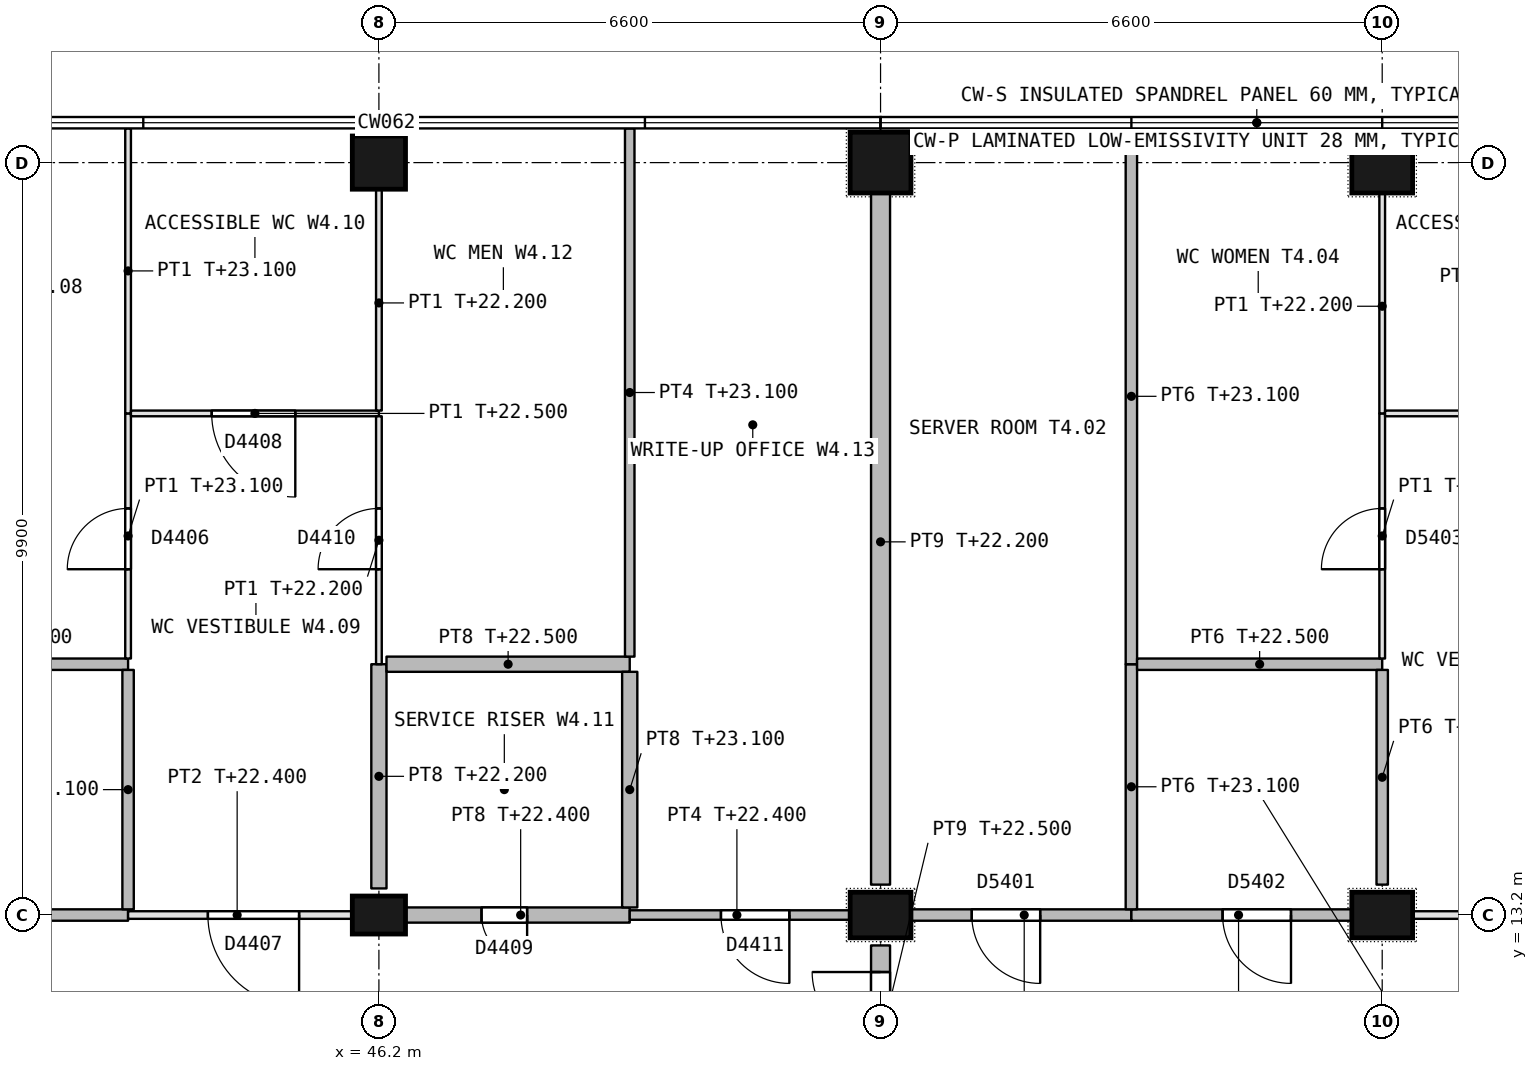
"""IFC4 building model, lengths in metres.
Left out: names, types, materials, properties, quantities, classifications, styles, units other than length and angle.
Written with IfcOpenShell. Run it as: python <this file> out.ifc"""

import sys

from ifc_helpers import new_model, si_unit, direction, frame, frame_2d, origin, origin_2d, place, context, subcontext, project, spatial, rectangle, extrude, element, fill, save


model = new_model("IFC4")
c1 = context("Model", 3, precision=1e-05, world=origin(), true_north=direction((0.0, 1.0)))
c2 = subcontext(c1, "Body", "Model", "MODEL_VIEW")
j1 = project(units=[si_unit("LENGTHUNIT", "METRE"), si_unit("PLANEANGLEUNIT", "RADIAN")], contexts=[c1])
p1 = place(None, origin())
s1 = spatial("IfcSite", under=j1, at=p1, CompositionType="ELEMENT")
p2 = place(p1, origin())
s2 = spatial("IfcBuilding", under=s1, at=p2, CompositionType="ELEMENT")
p3 = place(p2, frame((0.0, 0.0, 18.9)))
s3 = spatial("IfcBuildingStorey", under=s2, at=p3, CompositionType="ELEMENT", Elevation=18.9)
p4 = place(p3, frame((46.2, 13.2, 0.0), z_axis=(0.0, 0.0, 1.0), x_axis=(1.0, 0.0, 0.0)))
e1 = element("IfcColumn", 1, at=p4, inside=s3, PredefinedType="COLUMN", context=c2, shape_type="SweptSolid", body=[
    extrude(rectangle(XDim=0.7, YDim=0.5, at=origin_2d()), origin(), (0.0, 0.0, 1.0), 4.5),
])
p5 = place(p3, frame((46.2, 23.1, 0.0), z_axis=(0.0, 0.0, 1.0), x_axis=(1.0, 0.0, 0.0)))
e2 = element("IfcColumn", 2, at=p5, inside=s3, PredefinedType="COLUMN", context=c2, shape_type="SweptSolid", body=[
    extrude(rectangle(XDim=0.7, YDim=0.7, at=origin_2d()), origin(), (0.0, 0.0, 1.0), 4.5),
])
p6 = place(p3, frame((52.8, 13.2, 0.0), z_axis=(0.0, 0.0, 1.0), x_axis=(1.0, 0.0, 0.0)))
e3 = element("IfcColumn", 3, at=p6, inside=s3, PredefinedType="COLUMN", context=c2, shape_type="SweptSolid", body=[
    extrude(rectangle(XDim=0.8, YDim=0.6, at=origin_2d()), origin(), (0.0, 0.0, 1.0), 4.5),
])
p7 = place(p3, frame((52.8, 23.1, 0.0), z_axis=(0.0, 0.0, 1.0), x_axis=(1.0, 0.0, 0.0)))
e4 = element("IfcColumn", 4, at=p7, inside=s3, PredefinedType="COLUMN", context=c2, shape_type="SweptSolid", body=[
    extrude(rectangle(XDim=0.8, YDim=0.8, at=origin_2d()), origin(), (0.0, 0.0, 1.0), 4.5),
])
p8 = place(p3, frame((59.4, 13.2, 0.0), z_axis=(0.0, 0.0, 1.0), x_axis=(1.0, 0.0, 0.0)))
e5 = element("IfcColumn", 5, at=p8, inside=s3, PredefinedType="COLUMN", context=c2, shape_type="SweptSolid", body=[
    extrude(rectangle(XDim=0.8, YDim=0.6, at=origin_2d()), origin(), (0.0, 0.0, 1.0), 4.5),
])
p9 = place(p3, frame((59.4, 23.1, 0.0), z_axis=(0.0, 0.0, 1.0), x_axis=(1.0, 0.0, 0.0)))
e6 = element("IfcColumn", 6, at=p9, inside=s3, PredefinedType="COLUMN", context=c2, shape_type="SweptSolid", body=[
    extrude(rectangle(XDim=0.8, YDim=0.8, at=origin_2d()), origin(), (0.0, 0.0, 1.0), 4.5),
])
p10 = place(p3, frame((42.9, 13.2, 0.0), z_axis=(0.0, 0.0, 1.0), x_axis=(-1.0, 0.0, 0.0)))
e7 = element("IfcWall", 7, at=p10, inside=s3, PredefinedType="PARTITIONING", context=c2, shape_type="SweptSolid", body=[
    extrude(rectangle(XDim=3.3, YDim=0.15, at=frame_2d((1.65, 0.0))), origin(), (0.0, 0.0, 1.0), 3.5),
])
p11 = place(p10, frame((1.2, 0.0, 0.0)))
e8 = element("IfcOpeningElement", 8, at=p11, cuts=e7, PredefinedType="OPENING", context=c2, shape_type="SweptSolid", body=[
    extrude(rectangle(XDim=0.9, YDim=2.1, at=frame_2d((0.45, 1.05))), frame((0.0, 0.085, 0.0), z_axis=(0.0, -1.0, 0.0), x_axis=(1.0, 0.0, 0.0)), (0.0, 0.0, 1.0), 0.17),
])
p12 = place(p3, frame((42.9, 13.2, 0.0), z_axis=(0.0, 0.0, 1.0), x_axis=(1.0, 0.0, 0.0)))
e9 = element("IfcWall", 9, at=p12, inside=s3, PredefinedType="PARTITIONING", context=c2, shape_type="SweptSolid", body=[
    extrude(rectangle(XDim=2.95, YDim=0.1, at=frame_2d((1.475, 0.0))), origin(), (0.0, 0.0, 1.0), 3.5),
])
p13 = place(p12, frame((1.05, 0.0, 0.0)))
e10 = element("IfcOpeningElement", 10, at=p13, cuts=e9, PredefinedType="OPENING", context=c2, shape_type="SweptSolid", body=[
    extrude(rectangle(XDim=1.2, YDim=2.1, at=frame_2d((0.6, 1.05))), frame((0.0, 0.06, 0.0), z_axis=(0.0, -1.0, 0.0), x_axis=(1.0, 0.0, 0.0)), (0.0, 0.0, 1.0), 0.12),
])
p14 = place(p3, frame((46.55, 13.2, 0.0), z_axis=(0.0, 0.0, 1.0), x_axis=(1.0, 0.0, 0.0)))
e11 = element("IfcWall", 11, at=p14, inside=s3, PredefinedType="PARTITIONING", context=c2, shape_type="SweptSolid", body=[
    extrude(rectangle(XDim=2.95, YDim=0.2, at=frame_2d((1.475, 0.0))), origin(), (0.0, 0.0, 1.0), 3.5),
])
p15 = place(p14, frame((1.0, 0.0, 0.0)))
e12 = element("IfcOpeningElement", 12, at=p15, cuts=e11, PredefinedType="OPENING", context=c2, shape_type="SweptSolid", body=[
    extrude(rectangle(XDim=0.6, YDim=2.1, at=frame_2d((0.3, 1.05))), frame((0.0, 0.11, 0.0), z_axis=(0.0, -1.0, 0.0), x_axis=(1.0, 0.0, 0.0)), (0.0, 0.0, 1.0), 0.22),
])
p16 = place(p3, frame((49.5, 13.2, 0.0), z_axis=(0.0, 0.0, 1.0), x_axis=(1.0, 0.0, 0.0)))
e13 = element("IfcWall", 13, at=p16, inside=s3, PredefinedType="PARTITIONING", context=c2, shape_type="SweptSolid", body=[
    extrude(rectangle(XDim=2.9, YDim=0.125, at=frame_2d((1.45, 0.0))), origin(), (0.0, 0.0, 1.0), 3.5),
])
p17 = place(p16, frame((1.2, 0.0, 0.0)))
e14 = element("IfcOpeningElement", 14, at=p17, cuts=e13, PredefinedType="OPENING", context=c2, shape_type="SweptSolid", body=[
    extrude(rectangle(XDim=0.9, YDim=2.1, at=frame_2d((0.45, 1.05))), frame((0.0, 0.073, 0.0), z_axis=(0.0, -1.0, 0.0), x_axis=(1.0, 0.0, 0.0)), (0.0, 0.0, 1.0), 0.145),
])
p18 = place(p3, frame((52.8, 10.3, 0.0), z_axis=(0.0, 0.0, 1.0), x_axis=(0.0, 1.0, 0.0)))
e15 = element("IfcWall", 15, at=p18, inside=s3, PredefinedType="PARTITIONING", context=c2, shape_type="SweptSolid", body=[
    extrude(rectangle(XDim=2.5, YDim=0.25, at=frame_2d((1.25, 0.0))), origin(), (0.0, 0.0, 1.0), 3.6),
])
p19 = place(p18, frame((0.35, 0.0, 0.0)))
e16 = element("IfcOpeningElement", 16, at=p19, cuts=e15, PredefinedType="OPENING", context=c2, shape_type="SweptSolid", body=[
    extrude(rectangle(XDim=1.8, YDim=2.1, at=frame_2d((0.9, 1.05))), frame((0.0, 0.135, 0.0), z_axis=(0.0, -1.0, 0.0), x_axis=(1.0, 0.0, 0.0)), (0.0, 0.0, 1.0), 0.27),
])
p20 = place(p3, frame((42.9, 16.5, 0.0), z_axis=(0.0, 0.0, 1.0), x_axis=(-1.0, 0.0, 0.0)))
e17 = element("IfcWall", 17, at=p20, inside=s3, PredefinedType="PARTITIONING", context=c2, shape_type="SweptSolid", body=[
    extrude(rectangle(XDim=3.3, YDim=0.15, at=frame_2d((1.65, 0.0))), origin(), (0.0, 0.0, 1.0), 3.6),
])
p21 = place(p3, frame((42.9, 13.275, 0.0), z_axis=(0.0, 0.0, 1.0), x_axis=(0.0, 1.0, 0.0)))
e18 = element("IfcWall", 18, at=p21, inside=s3, PredefinedType="PARTITIONING", context=c2, shape_type="SweptSolid", body=[
    extrude(rectangle(XDim=3.15, YDim=0.15, at=frame_2d((1.575, 0.0))), origin(), (0.0, 0.0, 1.0), 4.2),
])
p22 = place(p3, frame((42.9, 16.575, 0.0), z_axis=(0.0, 0.0, 1.0), x_axis=(0.0, 1.0, 0.0)))
e19 = element("IfcWall", 19, at=p22, inside=s3, PredefinedType="PARTITIONING", context=c2, shape_type="SweptSolid", body=[
    extrude(rectangle(XDim=3.225, YDim=0.075, at=frame_2d((1.613, 0.0))), origin(), (0.0, 0.0, 1.0), 4.2),
])
p23 = place(p22, frame((1.175, 0.0, 0.0)))
e20 = element("IfcOpeningElement", 20, at=p23, cuts=e19, PredefinedType="OPENING", context=c2, shape_type="SweptSolid", body=[
    extrude(rectangle(XDim=0.8, YDim=2.1, at=frame_2d((0.4, 1.05))), frame((0.0, 0.047, 0.0), z_axis=(0.0, -1.0, 0.0), x_axis=(1.0, 0.0, 0.0)), (0.0, 0.0, 1.0), 0.095),
])
p24 = place(p3, frame((42.9, 19.8, 0.0), z_axis=(0.0, 0.0, 1.0), x_axis=(0.0, 1.0, 0.0)))
e21 = element("IfcWall", 21, at=p24, inside=s3, PredefinedType="PARTITIONING", context=c2, shape_type="SweptSolid", body=[
    extrude(rectangle(XDim=3.75, YDim=0.075, at=frame_2d((1.875, 0.0))), origin(), (0.0, 0.0, 1.0), 4.2),
])
p25 = place(p3, frame((42.938, 19.8, 0.0), z_axis=(0.0, 0.0, 1.0), x_axis=(1.0, 0.0, 0.0)))
e22 = element("IfcWall", 22, at=p25, inside=s3, PredefinedType="PARTITIONING", context=c2, shape_type="SweptSolid", body=[
    extrude(rectangle(XDim=3.262, YDim=0.075, at=frame_2d((1.631, 0.0))), origin(), (0.0, 0.0, 1.0), 3.6),
])
p26 = place(p25, frame((1.062, 0.0, 0.0)))
e23 = element("IfcOpeningElement", 23, at=p26, cuts=e22, PredefinedType="OPENING", context=c2, shape_type="SweptSolid", body=[
    extrude(rectangle(XDim=1.1, YDim=2.1, at=frame_2d((0.55, 1.05))), frame((0.0, 0.047, 0.0), z_axis=(0.0, -1.0, 0.0), x_axis=(1.0, 0.0, 0.0)), (0.0, 0.0, 1.0), 0.095),
])
p27 = place(p3, frame((46.2, 13.55, 0.0), z_axis=(0.0, 0.0, 1.0), x_axis=(0.0, 1.0, 0.0)))
e24 = element("IfcWall", 24, at=p27, inside=s3, PredefinedType="PARTITIONING", context=c2, shape_type="SweptSolid", body=[
    extrude(rectangle(XDim=2.95, YDim=0.2, at=frame_2d((1.475, 0.0))), origin(), (0.0, 0.0, 1.0), 3.3),
])
p28 = place(p3, frame((46.2, 19.762, 0.0), z_axis=(0.0, 0.0, 1.0), x_axis=(0.0, -1.0, 0.0)))
e25 = element("IfcWall", 25, at=p28, inside=s3, PredefinedType="PARTITIONING", context=c2, shape_type="SweptSolid", body=[
    extrude(rectangle(XDim=3.262, YDim=0.075, at=frame_2d((1.631, 0.0))), origin(), (0.0, 0.0, 1.0), 3.3),
])
p29 = place(p28, frame((1.212, 0.0, 0.0)))
e26 = element("IfcOpeningElement", 26, at=p29, cuts=e25, PredefinedType="OPENING", context=c2, shape_type="SweptSolid", body=[
    extrude(rectangle(XDim=0.8, YDim=2.1, at=frame_2d((0.4, 1.05))), frame((0.0, 0.047, 0.0), z_axis=(0.0, -1.0, 0.0), x_axis=(1.0, 0.0, 0.0)), (0.0, 0.0, 1.0), 0.095),
])
p30 = place(p3, frame((46.2, 19.837, 0.0), z_axis=(0.0, 0.0, 1.0), x_axis=(0.0, 1.0, 0.0)))
e27 = element("IfcWall", 27, at=p30, inside=s3, PredefinedType="PARTITIONING", context=c2, shape_type="SweptSolid", body=[
    extrude(rectangle(XDim=2.913, YDim=0.075, at=frame_2d((1.456, 0.0))), origin(), (0.0, 0.0, 1.0), 3.3),
])
p31 = place(p3, frame((49.5, 16.5, 0.0), z_axis=(0.0, 0.0, 1.0), x_axis=(-1.0, 0.0, 0.0)))
e28 = element("IfcWall", 28, at=p31, inside=s3, PredefinedType="PARTITIONING", context=c2, shape_type="SweptSolid", body=[
    extrude(rectangle(XDim=3.2, YDim=0.2, at=frame_2d((1.6, 0.0))), origin(), (0.0, 0.0, 1.0), 3.6),
])
p32 = place(p3, frame((49.5, 13.3, 0.0), z_axis=(0.0, 0.0, 1.0), x_axis=(0.0, 1.0, 0.0)))
e29 = element("IfcWall", 29, at=p32, inside=s3, PredefinedType="PARTITIONING", context=c2, shape_type="SweptSolid", body=[
    extrude(rectangle(XDim=3.1, YDim=0.2, at=frame_2d((1.55, 0.0))), origin(), (0.0, 0.0, 1.0), 4.2),
])
p33 = place(p3, frame((49.5, 16.6, 0.0), z_axis=(0.0, 0.0, 1.0), x_axis=(0.0, 1.0, 0.0)))
e30 = element("IfcWall", 30, at=p33, inside=s3, PredefinedType="PARTITIONING", context=c2, shape_type="SweptSolid", body=[
    extrude(rectangle(XDim=6.95, YDim=0.125, at=frame_2d((3.475, 0.0))), origin(), (0.0, 0.0, 1.0), 4.2),
])
p34 = place(p3, frame((52.8, 13.6, 0.0), z_axis=(0.0, 0.0, 1.0), x_axis=(0.0, 1.0, 0.0)))
e31 = element("IfcWall", 31, at=p34, inside=s3, PredefinedType="PARTITIONING", context=c2, shape_type="SweptSolid", body=[
    extrude(rectangle(XDim=9.1, YDim=0.25, at=frame_2d((4.55, 0.0))), origin(), (0.0, 0.0, 1.0), 3.3),
])
p35 = place(p3, frame((56.1, 13.2, 0.0), z_axis=(0.0, 0.0, 1.0), x_axis=(-1.0, 0.0, 0.0)))
e32 = element("IfcWall", 32, at=p35, inside=s3, PredefinedType="PARTITIONING", context=c2, shape_type="SweptSolid", body=[
    extrude(rectangle(XDim=2.9, YDim=0.15, at=frame_2d((1.45, 0.0))), origin(), (0.0, 0.0, 1.0), 3.5),
])
p36 = place(p35, frame((1.2, 0.0, 0.0)))
e33 = element("IfcOpeningElement", 33, at=p36, cuts=e32, PredefinedType="OPENING", context=c2, shape_type="SweptSolid", body=[
    extrude(rectangle(XDim=0.9, YDim=2.1, at=frame_2d((0.45, 1.05))), frame((0.0, 0.085, 0.0), z_axis=(0.0, -1.0, 0.0), x_axis=(1.0, 0.0, 0.0)), (0.0, 0.0, 1.0), 0.17),
])
p37 = place(p3, frame((59.0, 13.2, 0.0), z_axis=(0.0, 0.0, 1.0), x_axis=(-1.0, 0.0, 0.0)))
e34 = element("IfcWall", 34, at=p37, inside=s3, PredefinedType="PARTITIONING", context=c2, shape_type="SweptSolid", body=[
    extrude(rectangle(XDim=2.9, YDim=0.15, at=frame_2d((1.45, 0.0))), origin(), (0.0, 0.0, 1.0), 3.5),
])
p38 = place(p37, frame((0.8, 0.0, 0.0)))
e35 = element("IfcOpeningElement", 35, at=p38, cuts=e34, PredefinedType="OPENING", context=c2, shape_type="SweptSolid", body=[
    extrude(rectangle(XDim=0.9, YDim=2.1, at=frame_2d((0.45, 1.05))), frame((0.0, 0.085, 0.0), z_axis=(0.0, -1.0, 0.0), x_axis=(1.0, 0.0, 0.0)), (0.0, 0.0, 1.0), 0.17),
])
p39 = place(p3, frame((59.8, 13.2, 0.0), z_axis=(0.0, 0.0, 1.0), x_axis=(1.0, 0.0, 0.0)))
e36 = element("IfcWall", 36, at=p39, inside=s3, PredefinedType="PARTITIONING", context=c2, shape_type="SweptSolid", body=[
    extrude(rectangle(XDim=2.9, YDim=0.1, at=frame_2d((1.45, 0.0))), origin(), (0.0, 0.0, 1.0), 3.5),
])
p40 = place(p39, frame((0.65, 0.0, 0.0)))
e37 = element("IfcOpeningElement", 37, at=p40, cuts=e36, PredefinedType="OPENING", context=c2, shape_type="SweptSolid", body=[
    extrude(rectangle(XDim=1.2, YDim=2.1, at=frame_2d((0.6, 1.05))), frame((0.0, 0.06, 0.0), z_axis=(0.0, -1.0, 0.0), x_axis=(1.0, 0.0, 0.0)), (0.0, 0.0, 1.0), 0.12),
])
p41 = place(p3, frame((56.1, 13.275, 0.0), z_axis=(0.0, 0.0, 1.0), x_axis=(0.0, 1.0, 0.0)))
e38 = element("IfcWall", 38, at=p41, inside=s3, PredefinedType="PARTITIONING", context=c2, shape_type="SweptSolid", body=[
    extrude(rectangle(XDim=3.225, YDim=0.15, at=frame_2d((1.613, 0.0))), origin(), (0.0, 0.0, 1.0), 4.2),
])
p42 = place(p3, frame((56.1, 16.5, 0.0), z_axis=(0.0, 0.0, 1.0), x_axis=(0.0, 1.0, 0.0)))
e39 = element("IfcWall", 39, at=p42, inside=s3, PredefinedType="PARTITIONING", context=c2, shape_type="SweptSolid", body=[
    extrude(rectangle(XDim=7.05, YDim=0.15, at=frame_2d((3.525, 0.0))), origin(), (0.0, 0.0, 1.0), 4.2),
])
p43 = place(p3, frame((59.4, 16.5, 0.0), z_axis=(0.0, 0.0, 1.0), x_axis=(-1.0, 0.0, 0.0)))
e40 = element("IfcWall", 40, at=p43, inside=s3, PredefinedType="PARTITIONING", context=c2, shape_type="SweptSolid", body=[
    extrude(rectangle(XDim=3.225, YDim=0.15, at=frame_2d((1.612, 0.0))), origin(), (0.0, 0.0, 1.0), 3.6),
])
p44 = place(p3, frame((59.4, 13.6, 0.0), z_axis=(0.0, 0.0, 1.0), x_axis=(0.0, 1.0, 0.0)))
e41 = element("IfcWall", 41, at=p44, inside=s3, PredefinedType="PARTITIONING", context=c2, shape_type="SweptSolid", body=[
    extrude(rectangle(XDim=2.825, YDim=0.15, at=frame_2d((1.413, 0.0))), origin(), (0.0, 0.0, 1.0), 3.3),
])
p45 = place(p3, frame((59.4, 16.575, 0.0), z_axis=(0.0, 0.0, 1.0), x_axis=(0.0, 1.0, 0.0)))
e42 = element("IfcWall", 42, at=p45, inside=s3, PredefinedType="PARTITIONING", context=c2, shape_type="SweptSolid", body=[
    extrude(rectangle(XDim=3.225, YDim=0.075, at=frame_2d((1.613, 0.0))), origin(), (0.0, 0.0, 1.0), 3.3),
])
p46 = place(p45, frame((1.175, 0.0, 0.0)))
e43 = element("IfcOpeningElement", 43, at=p46, cuts=e42, PredefinedType="OPENING", context=c2, shape_type="SweptSolid", body=[
    extrude(rectangle(XDim=0.8, YDim=2.1, at=frame_2d((0.4, 1.05))), frame((0.0, 0.047, 0.0), z_axis=(0.0, -1.0, 0.0), x_axis=(1.0, 0.0, 0.0)), (0.0, 0.0, 1.0), 0.095),
])
p47 = place(p3, frame((59.4, 19.8, 0.0), z_axis=(0.0, 0.0, 1.0), x_axis=(0.0, 1.0, 0.0)))
e44 = element("IfcWall", 44, at=p47, inside=s3, PredefinedType="PARTITIONING", context=c2, shape_type="SweptSolid", body=[
    extrude(rectangle(XDim=2.9, YDim=0.075, at=frame_2d((1.45, 0.0))), origin(), (0.0, 0.0, 1.0), 3.3),
])
p48 = place(p3, frame((59.438, 19.8, 0.0), z_axis=(0.0, 0.0, 1.0), x_axis=(1.0, 0.0, 0.0)))
e45 = element("IfcWall", 45, at=p48, inside=s3, PredefinedType="PARTITIONING", context=c2, shape_type="SweptSolid", body=[
    extrude(rectangle(XDim=3.262, YDim=0.075, at=frame_2d((1.631, 0.0))), origin(), (0.0, 0.0, 1.0), 3.6),
])
p49 = place(p48, frame((1.062, 0.0, 0.0)))
e46 = element("IfcOpeningElement", 46, at=p49, cuts=e45, PredefinedType="OPENING", context=c2, shape_type="SweptSolid", body=[
    extrude(rectangle(XDim=1.1, YDim=2.1, at=frame_2d((0.55, 1.05))), frame((0.0, 0.047, 0.0), z_axis=(0.0, -1.0, 0.0), x_axis=(1.0, 0.0, 0.0)), (0.0, 0.0, 1.0), 0.095),
])
p50 = place(p19, origin())
e47 = element("IfcDoor", 47, at=p50, inside=s3, OperationType="DOUBLE_DOOR_SINGLE_SWING", PredefinedType="DOOR", context=c2, shape_type="SweptSolid", body=[
    extrude(rectangle(XDim=1.8, YDim=2.1, at=frame_2d((0.9, 1.05))), frame((0.0, 0.03, 0.0), z_axis=(0.0, -1.0, 0.0), x_axis=(1.0, 0.0, 0.0)), (0.0, 0.0, 1.0), 0.06),
])
fill(e16, e47)
p51 = place(p23, origin())
e48 = element("IfcDoor", 48, at=p51, inside=s3, OperationType="SINGLE_SWING_LEFT", PredefinedType="DOOR", context=c2, shape_type="SweptSolid", body=[
    extrude(rectangle(XDim=0.8, YDim=2.1, at=frame_2d((0.4, 1.05))), frame((0.0, 0.022, 0.0), z_axis=(0.0, -1.0, 0.0), x_axis=(1.0, 0.0, 0.0)), (0.0, 0.0, 1.0), 0.044),
])
fill(e20, e48)
p52 = place(p13, origin())
e49 = element("IfcDoor", 49, at=p52, inside=s3, OperationType="SINGLE_SWING_RIGHT", PredefinedType="DOOR", context=c2, shape_type="SweptSolid", body=[
    extrude(rectangle(XDim=1.2, YDim=2.1, at=frame_2d((0.6, 1.05))), frame((0.0, 0.022, 0.0), z_axis=(0.0, -1.0, 0.0), x_axis=(1.0, 0.0, 0.0)), (0.0, 0.0, 1.0), 0.044),
])
fill(e10, e49)
p53 = place(p26, origin())
e50 = element("IfcDoor", 50, at=p53, inside=s3, OperationType="SINGLE_SWING_RIGHT", PredefinedType="DOOR", context=c2, shape_type="SweptSolid", body=[
    extrude(rectangle(XDim=1.1, YDim=2.1, at=frame_2d((0.55, 1.05))), frame((0.0, 0.022, 0.0), z_axis=(0.0, -1.0, 0.0), x_axis=(1.0, 0.0, 0.0)), (0.0, 0.0, 1.0), 0.044),
])
fill(e23, e50)
p54 = place(p15, origin())
e51 = element("IfcDoor", 51, at=p54, inside=s3, OperationType="SINGLE_SWING_RIGHT", PredefinedType="DOOR", context=c2, shape_type="SweptSolid", body=[
    extrude(rectangle(XDim=0.6, YDim=2.1, at=frame_2d((0.3, 1.05))), frame((0.0, 0.03, 0.0), z_axis=(0.0, -1.0, 0.0), x_axis=(1.0, 0.0, 0.0)), (0.0, 0.0, 1.0), 0.06),
])
fill(e12, e51)
p55 = place(p29, origin())
e52 = element("IfcDoor", 52, at=p55, inside=s3, OperationType="SINGLE_SWING_RIGHT", PredefinedType="DOOR", context=c2, shape_type="SweptSolid", body=[
    extrude(rectangle(XDim=0.8, YDim=2.1, at=frame_2d((0.4, 1.05))), frame((0.0, 0.022, 0.0), z_axis=(0.0, -1.0, 0.0), x_axis=(1.0, 0.0, 0.0)), (0.0, 0.0, 1.0), 0.044),
])
fill(e26, e52)
p56 = place(p17, origin())
e53 = element("IfcDoor", 53, at=p56, inside=s3, OperationType="SINGLE_SWING_RIGHT", PredefinedType="DOOR", context=c2, shape_type="SweptSolid", body=[
    extrude(rectangle(XDim=0.9, YDim=2.1, at=frame_2d((0.45, 1.05))), frame((0.0, 0.027, 0.0), z_axis=(0.0, -1.0, 0.0), x_axis=(1.0, 0.0, 0.0)), (0.0, 0.0, 1.0), 0.054),
])
fill(e14, e53)
p57 = place(p36, origin())
e54 = element("IfcDoor", 54, at=p57, inside=s3, OperationType="SINGLE_SWING_LEFT", PredefinedType="DOOR", context=c2, shape_type="SweptSolid", body=[
    extrude(rectangle(XDim=0.9, YDim=2.1, at=frame_2d((0.45, 1.05))), frame((0.0, 0.03, 0.0), z_axis=(0.0, -1.0, 0.0), x_axis=(1.0, 0.0, 0.0)), (0.0, 0.0, 1.0), 0.06),
])
fill(e33, e54)
p58 = place(p38, origin())
e55 = element("IfcDoor", 55, at=p58, inside=s3, OperationType="SINGLE_SWING_LEFT", PredefinedType="DOOR", context=c2, shape_type="SweptSolid", body=[
    extrude(rectangle(XDim=0.9, YDim=2.1, at=frame_2d((0.45, 1.05))), frame((0.0, 0.027, 0.0), z_axis=(0.0, -1.0, 0.0), x_axis=(1.0, 0.0, 0.0)), (0.0, 0.0, 1.0), 0.054),
])
fill(e35, e55)
p59 = place(p46, origin())
e56 = element("IfcDoor", 56, at=p59, inside=s3, OperationType="SINGLE_SWING_LEFT", PredefinedType="DOOR", context=c2, shape_type="SweptSolid", body=[
    extrude(rectangle(XDim=0.8, YDim=2.1, at=frame_2d((0.4, 1.05))), frame((0.0, 0.022, 0.0), z_axis=(0.0, -1.0, 0.0), x_axis=(1.0, 0.0, 0.0)), (0.0, 0.0, 1.0), 0.044),
])
fill(e43, e56)
save(model, sys.argv[1])
